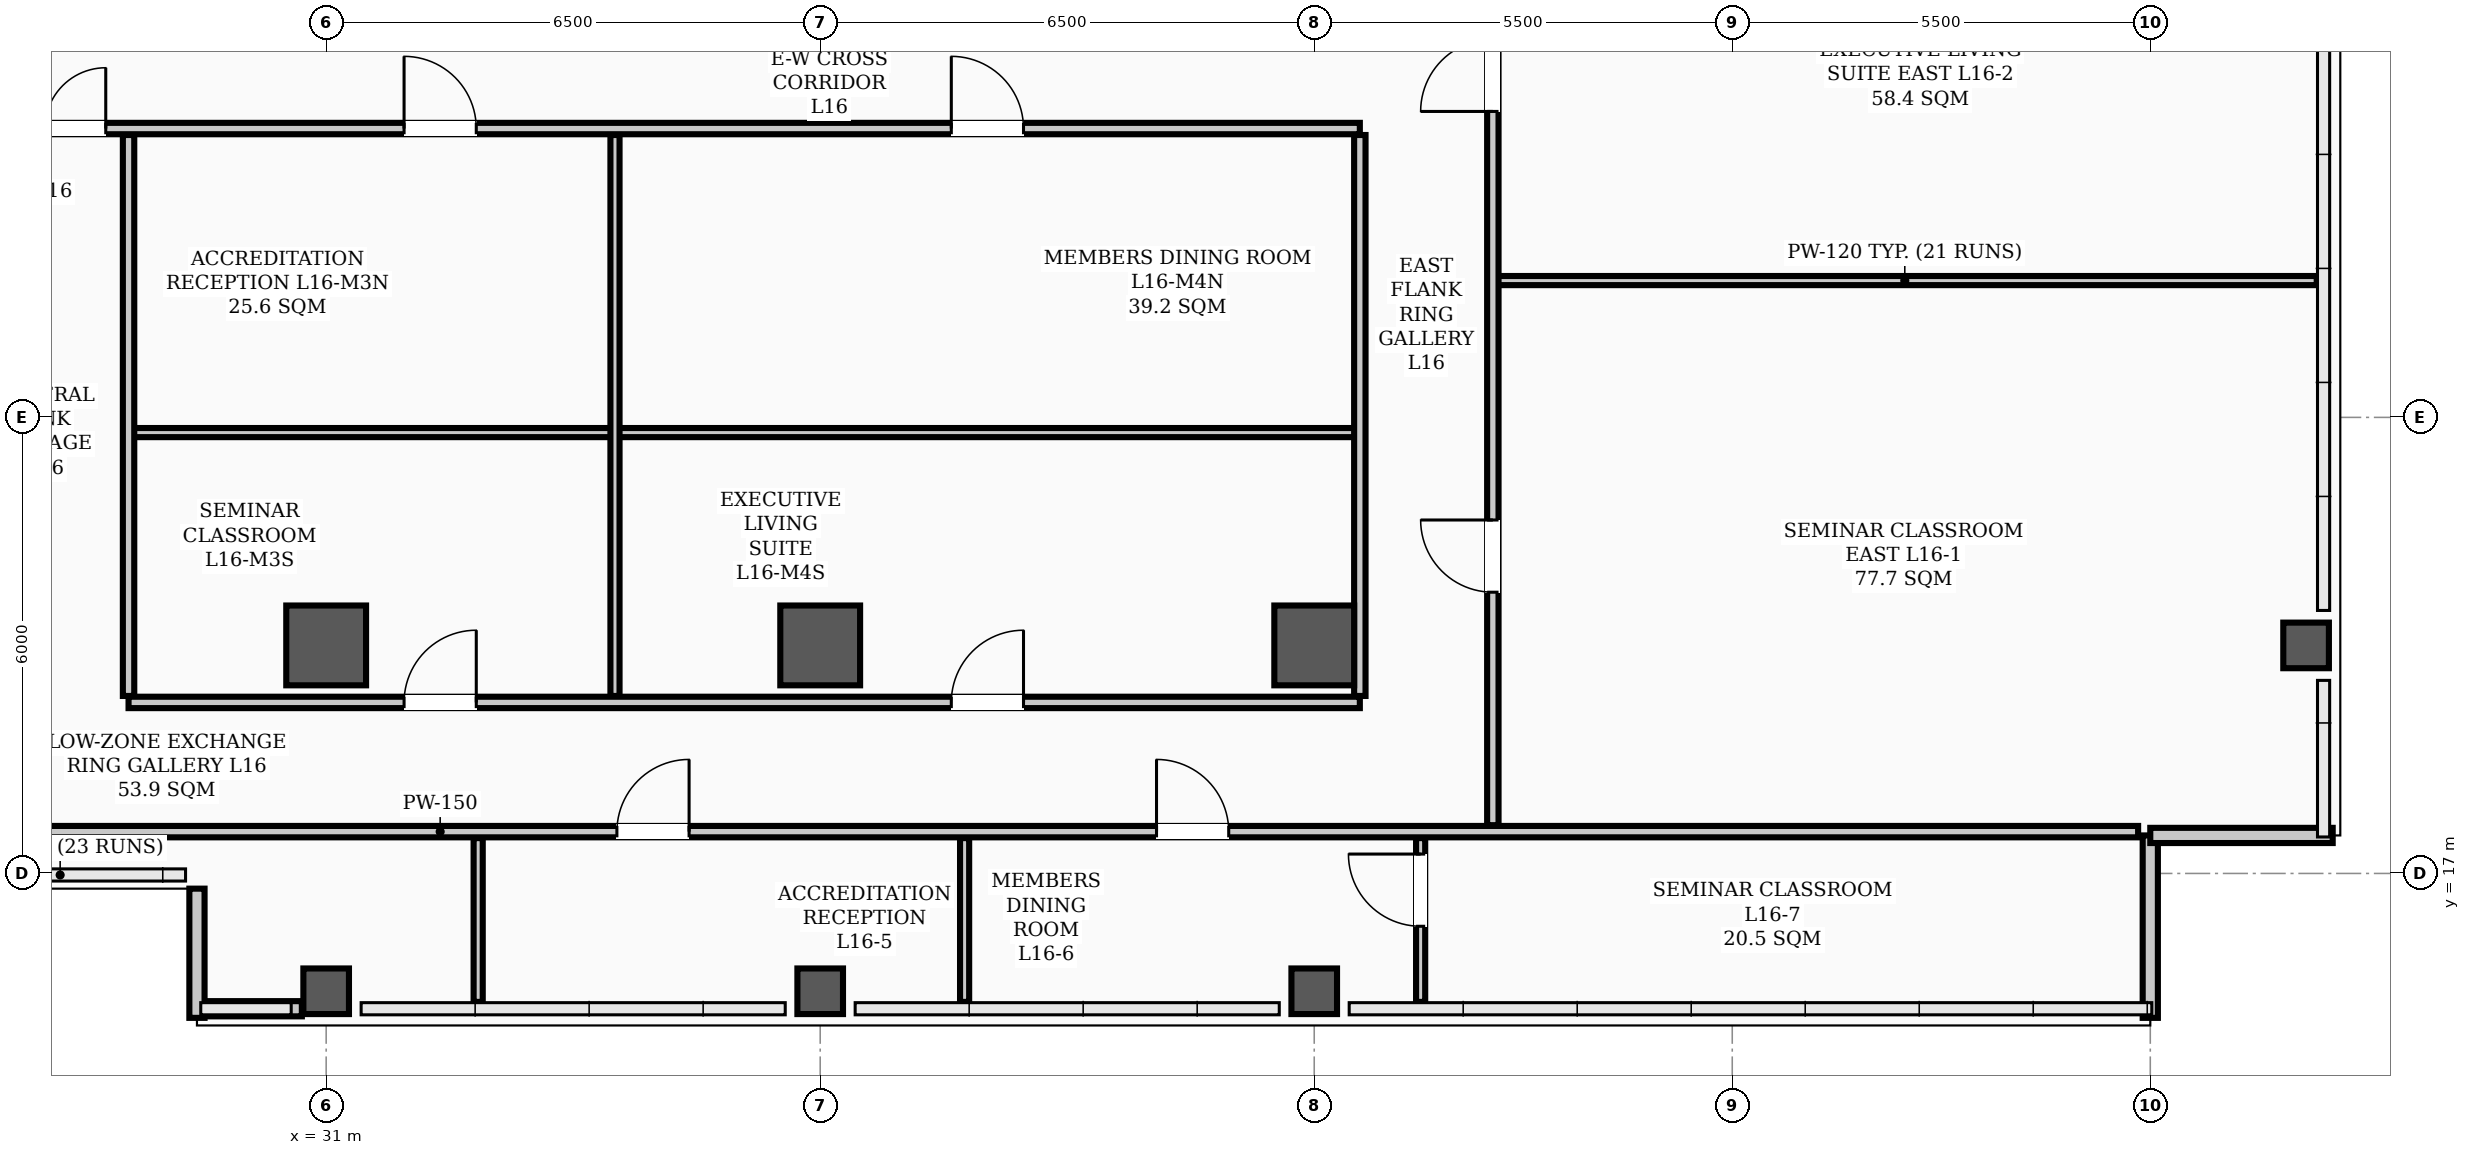
"""IFC4 building model, lengths in metres.
Left out: names, types, materials, properties, quantities, classifications, styles, units other than length and angle.
Written with IfcOpenShell. Run it as: python <this file> out.ifc"""

import sys

from ifc_helpers import new_model, si_unit, direction, frame, frame_2d, origin, origin_2d, place, context, subcontext, project, spatial, rectangle, hollow_rectangle, extrude, element, fill, save


model = new_model("IFC4")
c1 = context("Model", 3, precision=1e-05, world=origin(), true_north=direction((0.0, 1.0)))
c2 = subcontext(c1, "Body", "Model", "MODEL_VIEW")
j1 = project(units=[si_unit("LENGTHUNIT", "METRE"), si_unit("PLANEANGLEUNIT", "RADIAN")], contexts=[c1])
p1 = place(None, origin())
s1 = spatial("IfcSite", under=j1, at=p1, CompositionType="ELEMENT")
p2 = place(p1, origin())
s2 = spatial("IfcBuilding", under=s1, at=p2, CompositionType="ELEMENT")
p3 = place(p2, frame((0.0, 0.0, 65.5)))
s3 = spatial("IfcBuildingStorey", under=s2, at=p3, CompositionType="ELEMENT", Elevation=65.5)
for number, where, z_axis, x_axis in (
    (1, (31.0, 20.0, 0.0), (0.0, 0.0, 1.0), (1.0, 0.0, 0.0)),
    (2, (37.5, 20.0, 0.0), (0.0, 0.0, 1.0), (1.0, 0.0, 0.0)),
    (3, (44.0, 20.0, 0.0), (0.0, 0.0, 1.0), (1.0, 0.0, 0.0)),
):
    element("IfcColumn", number, at=place(p3, frame(where, z_axis=z_axis, x_axis=x_axis)), inside=s3, PredefinedType="COLUMN", context=c2, shape_type="SweptSolid", body=[
        extrude(hollow_rectangle(XDim=1.05, YDim=1.05, WallThickness=0.038, InnerFilletRadius=0.019, OuterFilletRadius=0.057, at=origin_2d()), origin(), (0.0, 0.0, 1.0), 3.9),
    ])
for number, where, z_axis, x_axis in (
    (4, (31.0, 15.45, 0.0), (0.0, 0.0, 1.0), (1.0, 0.0, 0.0)),
    (5, (37.5, 15.45, 0.0), (0.0, 0.0, 1.0), (1.0, 0.0, 0.0)),
    (6, (44.0, 15.45, 0.0), (0.0, 0.0, 1.0), (1.0, 0.0, 0.0)),
    (7, (57.05, 20.0, 0.0), (0.0, 0.0, 1.0), (1.0, 0.0, 0.0)),
):
    element("IfcColumn", number, at=place(p3, frame(where, z_axis=z_axis, x_axis=x_axis)), inside=s3, PredefinedType="COLUMN", context=c2, shape_type="SweptSolid", body=[
        extrude(hollow_rectangle(XDim=0.6, YDim=0.6, WallThickness=0.026, InnerFilletRadius=0.013, OuterFilletRadius=0.039, at=origin_2d()), origin(), (0.0, 0.0, 1.0), 3.9),
    ])
p4 = place(p3, frame((29.35, 15.22, 0.0), z_axis=(0.0, 0.0, 1.0), x_axis=(1.0, 0.0, 0.0)))
e8 = element("IfcWall", 8, at=p4, inside=s3, PredefinedType="PARAPET", context=c2, shape_type="SweptSolid", body=[
    extrude(rectangle(XDim=1.33, YDim=0.2, at=frame_2d((0.665, 0.0))), origin(), (0.0, 0.0, 1.0), 1.2),
])
for number, where, z_axis, x_axis in (
    (9, (55.0, 15.1, 0.0), (0.0, 0.0, 1.0), (0.0, 1.0, 0.0)),
    (10, (55.0, 17.5, 0.0), (0.0, 0.0, 1.0), (1.0, 0.0, 0.0)),
):
    element("IfcWall", number, at=place(p3, frame(where, z_axis=z_axis, x_axis=x_axis)), inside=s3, PredefinedType="PARAPET", context=c2, shape_type="SweptSolid", body=[
        extrude(rectangle(XDim=2.4, YDim=0.2, at=frame_2d((1.2, 0.0))), origin(), (0.0, 0.0, 1.0), 1.2),
    ])
p5 = place(p3, frame((29.3, 16.8, 0.0), z_axis=(0.0, 0.0, 1.0), x_axis=(0.0, -1.0, 0.0)))
e11 = element("IfcWall", 11, at=p5, inside=s3, PredefinedType="PARAPET", context=c2, shape_type="SweptSolid", body=[
    extrude(rectangle(XDim=1.7, YDim=0.2, at=frame_2d((0.85, 0.0))), origin(), (0.0, 0.0, 1.0), 1.2),
])
p6 = place(p3, frame((12.9, 26.8, 0.0), z_axis=(0.0, 0.0, 1.0), x_axis=(1.0, 0.0, 0.0)))
e12 = element("IfcWall", 12, at=p6, inside=s3, PredefinedType="PARTITIONING", context=c2, shape_type="SweptSolid", body=[
    extrude(rectangle(XDim=31.7, YDim=0.15, at=frame_2d((15.85, 0.0))), origin(), (0.0, 0.0, 1.0), 3.1),
])
p7 = place(p6, frame((13.6, 0.0, 0.0)))
e13 = element("IfcOpeningElement", 13, at=p7, cuts=e12, PredefinedType="OPENING", context=c2, shape_type="SweptSolid", body=[
    extrude(rectangle(XDim=1.6, YDim=2.08, at=frame_2d((0.8, 1.04))), frame((0.0, 0.085, 0.0), z_axis=(0.0, -1.0, 0.0), x_axis=(1.0, 0.0, 0.0)), (0.0, 0.0, 1.0), 0.17),
])
p8 = place(p6, frame((2.475, 0.0, 0.0)))
e14 = element("IfcOpeningElement", 14, at=p8, cuts=e12, PredefinedType="OPENING", context=c2, shape_type="SweptSolid", body=[
    extrude(rectangle(XDim=0.95, YDim=2.08, at=frame_2d((0.475, 1.04))), frame((0.0, 0.085, 0.0), z_axis=(0.0, -1.0, 0.0), x_axis=(1.0, 0.0, 0.0)), (0.0, 0.0, 1.0), 0.17),
])
p9 = place(p6, frame((9.125, 0.0, 0.0)))
e15 = element("IfcOpeningElement", 15, at=p9, cuts=e12, PredefinedType="OPENING", context=c2, shape_type="SweptSolid", body=[
    extrude(rectangle(XDim=0.95, YDim=2.08, at=frame_2d((0.475, 1.04))), frame((0.0, 0.085, 0.0), z_axis=(0.0, -1.0, 0.0), x_axis=(1.0, 0.0, 0.0)), (0.0, 0.0, 1.0), 0.17),
])
p10 = place(p6, frame((19.125, 0.0, 0.0)))
e16 = element("IfcOpeningElement", 16, at=p10, cuts=e12, PredefinedType="OPENING", context=c2, shape_type="SweptSolid", body=[
    extrude(rectangle(XDim=0.95, YDim=2.08, at=frame_2d((0.475, 1.04))), frame((0.0, 0.085, 0.0), z_axis=(0.0, -1.0, 0.0), x_axis=(1.0, 0.0, 0.0)), (0.0, 0.0, 1.0), 0.17),
])
p11 = place(p6, frame((26.325, 0.0, 0.0)))
e17 = element("IfcOpeningElement", 17, at=p11, cuts=e12, PredefinedType="OPENING", context=c2, shape_type="SweptSolid", body=[
    extrude(rectangle(XDim=0.95, YDim=2.08, at=frame_2d((0.475, 1.04))), frame((0.0, 0.085, 0.0), z_axis=(0.0, -1.0, 0.0), x_axis=(1.0, 0.0, 0.0)), (0.0, 0.0, 1.0), 0.17),
])
p12 = place(p3, frame((10.16, 17.55, 0.0), z_axis=(0.0, 0.0, 1.0), x_axis=(1.0, 0.0, 0.0)))
e18 = element("IfcWall", 18, at=p12, inside=s3, PredefinedType="PARTITIONING", context=c2, shape_type="SweptSolid", body=[
    extrude(rectangle(XDim=44.68, YDim=0.15, at=frame_2d((22.34, 0.0))), origin(), (0.0, 0.0, 1.0), 3.1),
])
p13 = place(p12, frame((2.04, 0.0, 0.0)))
e19 = element("IfcOpeningElement", 19, at=p13, cuts=e18, PredefinedType="OPENING", context=c2, shape_type="SweptSolid", body=[
    extrude(rectangle(XDim=0.95, YDim=2.08, at=frame_2d((0.475, 1.04))), frame((0.0, 0.085, 0.0), z_axis=(0.0, -1.0, 0.0), x_axis=(1.0, 0.0, 0.0)), (0.0, 0.0, 1.0), 0.17),
])
p14 = place(p12, frame((6.565, 0.0, 0.0)))
e20 = element("IfcOpeningElement", 20, at=p14, cuts=e18, PredefinedType="OPENING", context=c2, shape_type="SweptSolid", body=[
    extrude(rectangle(XDim=0.95, YDim=2.08, at=frame_2d((0.475, 1.04))), frame((0.0, 0.085, 0.0), z_axis=(0.0, -1.0, 0.0), x_axis=(1.0, 0.0, 0.0)), (0.0, 0.0, 1.0), 0.17),
])
p15 = place(p12, frame((11.865, 0.0, 0.0)))
e21 = element("IfcOpeningElement", 21, at=p15, cuts=e18, PredefinedType="OPENING", context=c2, shape_type="SweptSolid", body=[
    extrude(rectangle(XDim=0.95, YDim=2.08, at=frame_2d((0.475, 1.04))), frame((0.0, 0.085, 0.0), z_axis=(0.0, -1.0, 0.0), x_axis=(1.0, 0.0, 0.0)), (0.0, 0.0, 1.0), 0.17),
])
p16 = place(p12, frame((24.665, 0.0, 0.0)))
e22 = element("IfcOpeningElement", 22, at=p16, cuts=e18, PredefinedType="OPENING", context=c2, shape_type="SweptSolid", body=[
    extrude(rectangle(XDim=0.95, YDim=2.08, at=frame_2d((0.475, 1.04))), frame((0.0, 0.085, 0.0), z_axis=(0.0, -1.0, 0.0), x_axis=(1.0, 0.0, 0.0)), (0.0, 0.0, 1.0), 0.17),
])
p17 = place(p12, frame((31.765, 0.0, 0.0)))
e23 = element("IfcOpeningElement", 23, at=p17, cuts=e18, PredefinedType="OPENING", context=c2, shape_type="SweptSolid", body=[
    extrude(rectangle(XDim=0.95, YDim=2.08, at=frame_2d((0.475, 1.04))), frame((0.0, 0.085, 0.0), z_axis=(0.0, -1.0, 0.0), x_axis=(1.0, 0.0, 0.0)), (0.0, 0.0, 1.0), 0.17),
])
p18 = place(p3, frame((28.4, 19.25, 0.0), z_axis=(0.0, 0.0, 1.0), x_axis=(1.0, 0.0, 0.0)))
e24 = element("IfcWall", 24, at=p18, inside=s3, PredefinedType="PARTITIONING", context=c2, shape_type="SweptSolid", body=[
    extrude(rectangle(XDim=16.2, YDim=0.15, at=frame_2d((8.1, 0.0))), origin(), (0.0, 0.0, 1.0), 3.1),
])
p19 = place(p18, frame((3.625, 0.0, 0.0)))
e25 = element("IfcOpeningElement", 25, at=p19, cuts=e24, PredefinedType="OPENING", context=c2, shape_type="SweptSolid", body=[
    extrude(rectangle(XDim=0.95, YDim=2.08, at=frame_2d((0.475, 1.04))), frame((0.0, 0.085, 0.0), z_axis=(0.0, -1.0, 0.0), x_axis=(1.0, 0.0, 0.0)), (0.0, 0.0, 1.0), 0.17),
])
p20 = place(p18, frame((10.825, 0.0, 0.0)))
e26 = element("IfcOpeningElement", 26, at=p20, cuts=e24, PredefinedType="OPENING", context=c2, shape_type="SweptSolid", body=[
    extrude(rectangle(XDim=0.95, YDim=2.08, at=frame_2d((0.475, 1.04))), frame((0.0, 0.085, 0.0), z_axis=(0.0, -1.0, 0.0), x_axis=(1.0, 0.0, 0.0)), (0.0, 0.0, 1.0), 0.17),
])
p21 = place(p3, frame((28.4, 22.8, 0.0), z_axis=(0.0, 0.0, 1.0), x_axis=(1.0, 0.0, 0.0)))
e27 = element("IfcWall", 27, at=p21, inside=s3, PredefinedType="PARTITIONING", context=c2, shape_type="SweptSolid", body=[
    extrude(rectangle(XDim=6.4, YDim=0.12, at=frame_2d((3.2, 0.0))), origin(), (0.0, 0.0, 1.0), 3.1),
])
p22 = place(p3, frame((34.8, 22.8, 0.0), z_axis=(0.0, 0.0, 1.0), x_axis=(1.0, 0.0, 0.0)))
e28 = element("IfcWall", 28, at=p22, inside=s3, PredefinedType="PARTITIONING", context=c2, shape_type="SweptSolid", body=[
    extrude(rectangle(XDim=9.8, YDim=0.12, at=frame_2d((4.9, 0.0))), origin(), (0.0, 0.0, 1.0), 3.1),
])
p23 = place(p3, frame((46.35, 24.8, 0.0), z_axis=(0.0, 0.0, 1.0), x_axis=(1.0, 0.0, 0.0)))
e29 = element("IfcWall", 29, at=p23, inside=s3, PredefinedType="PARTITIONING", context=c2, shape_type="SweptSolid", body=[
    extrude(rectangle(XDim=10.84, YDim=0.12, at=frame_2d((5.42, 0.0))), origin(), (0.0, 0.0, 1.0), 3.212),
])
p24 = place(p3, frame((28.4, 19.335, 0.0), z_axis=(0.0, 0.0, 1.0), x_axis=(0.0, 1.0, 0.0)))
e30 = element("IfcWall", 30, at=p24, inside=s3, PredefinedType="PARTITIONING", context=c2, shape_type="SweptSolid", body=[
    extrude(rectangle(XDim=7.38, YDim=0.15, at=frame_2d((3.69, 0.0))), origin(), (0.0, 0.0, 1.0), 3.0),
])
p25 = place(p3, frame((46.35, 17.635, 0.0), z_axis=(0.0, 0.0, 1.0), x_axis=(0.0, 1.0, 0.0)))
e31 = element("IfcWall", 31, at=p25, inside=s3, PredefinedType="PARTITIONING", context=c2, shape_type="SweptSolid", body=[
    extrude(rectangle(XDim=22.53, YDim=0.15, at=frame_2d((11.265, 0.0))), origin(), (0.0, 0.0, 1.0), 3.0),
])
p26 = place(p25, frame((3.065, 0.0, 0.0)))
e32 = element("IfcOpeningElement", 32, at=p26, cuts=e31, PredefinedType="OPENING", context=c2, shape_type="SweptSolid", body=[
    extrude(rectangle(XDim=0.95, YDim=2.08, at=frame_2d((0.475, 1.04))), frame((0.0, 0.085, 0.0), z_axis=(0.0, -1.0, 0.0), x_axis=(1.0, 0.0, 0.0)), (0.0, 0.0, 1.0), 0.17),
])
p27 = place(p25, frame((9.39, 0.0, 0.0)))
e33 = element("IfcOpeningElement", 33, at=p27, cuts=e31, PredefinedType="OPENING", context=c2, shape_type="SweptSolid", body=[
    extrude(rectangle(XDim=0.95, YDim=2.08, at=frame_2d((0.475, 1.04))), frame((0.0, 0.085, 0.0), z_axis=(0.0, -1.0, 0.0), x_axis=(1.0, 0.0, 0.0)), (0.0, 0.0, 1.0), 0.17),
])
p28 = place(p25, frame((14.69, 0.0, 0.0)))
e34 = element("IfcOpeningElement", 34, at=p28, cuts=e31, PredefinedType="OPENING", context=c2, shape_type="SweptSolid", body=[
    extrude(rectangle(XDim=0.95, YDim=2.08, at=frame_2d((0.475, 1.04))), frame((0.0, 0.085, 0.0), z_axis=(0.0, -1.0, 0.0), x_axis=(1.0, 0.0, 0.0)), (0.0, 0.0, 1.0), 0.17),
])
p29 = place(p25, frame((19.715, 0.0, 0.0)))
e35 = element("IfcOpeningElement", 35, at=p29, cuts=e31, PredefinedType="OPENING", context=c2, shape_type="SweptSolid", body=[
    extrude(rectangle(XDim=0.95, YDim=2.08, at=frame_2d((0.475, 1.04))), frame((0.0, 0.085, 0.0), z_axis=(0.0, -1.0, 0.0), x_axis=(1.0, 0.0, 0.0)), (0.0, 0.0, 1.0), 0.17),
])
p30 = place(p3, frame((44.6, 19.335, 0.0), z_axis=(0.0, 0.0, 1.0), x_axis=(0.0, 1.0, 0.0)))
e36 = element("IfcWall", 36, at=p30, inside=s3, PredefinedType="PARTITIONING", context=c2, shape_type="SweptSolid", body=[
    extrude(rectangle(XDim=7.38, YDim=0.15, at=frame_2d((3.69, 0.0))), origin(), (0.0, 0.0, 1.0), 3.0),
])
for number, where, z_axis, x_axis in (
    (37, (33.0, 15.31, 0.0), (0.0, 0.0, 1.0), (0.0, 1.0, 0.0)),
    (38, (39.4, 15.31, 0.0), (0.0, 0.0, 1.0), (0.0, 1.0, 0.0)),
):
    element("IfcWall", number, at=place(p3, frame(where, z_axis=z_axis, x_axis=x_axis)), inside=s3, PredefinedType="PARTITIONING", context=c2, shape_type="SweptSolid", body=[
        extrude(rectangle(XDim=2.155, YDim=0.12, at=frame_2d((1.078, 0.0))), origin(), (0.0, 0.0, 1.0), 3.212),
    ])
p31 = place(p3, frame((45.4, 15.31, 0.0), z_axis=(0.0, 0.0, 1.0), x_axis=(0.0, 1.0, 0.0)))
e39 = element("IfcWall", 39, at=p31, inside=s3, PredefinedType="PARTITIONING", context=c2, shape_type="SweptSolid", body=[
    extrude(rectangle(XDim=2.155, YDim=0.12, at=frame_2d((1.078, 0.0))), origin(), (0.0, 0.0, 1.0), 3.72),
])
p32 = place(p31, frame((0.995, 0.0, 0.0)))
e40 = element("IfcOpeningElement", 40, at=p32, cuts=e39, PredefinedType="OPENING", context=c2, shape_type="SweptSolid", body=[
    extrude(rectangle(XDim=0.95, YDim=2.08, at=frame_2d((0.475, 1.04))), frame((0.0, 0.07, 0.0), z_axis=(0.0, -1.0, 0.0), x_axis=(1.0, 0.0, 0.0)), (0.0, 0.0, 1.0), 0.14),
])
p33 = place(p3, frame((34.8, 19.335, 0.0), z_axis=(0.0, 0.0, 1.0), x_axis=(0.0, 1.0, 0.0)))
e41 = element("IfcWall", 41, at=p33, inside=s3, PredefinedType="PARTITIONING", context=c2, shape_type="SweptSolid", body=[
    extrude(rectangle(XDim=7.38, YDim=0.12, at=frame_2d((3.69, 0.0))), origin(), (0.0, 0.0, 1.0), 3.0),
])
p34 = place(p7, origin())
e42 = element("IfcDoor", 42, at=p34, inside=s3, OperationType="DOUBLE_DOOR_SINGLE_SWING", PredefinedType="DOOR", context=c2, shape_type="SweptSolid", body=[
    extrude(rectangle(XDim=1.6, YDim=2.08, at=frame_2d((0.8, 1.04))), frame((0.0, 0.025, 0.0), z_axis=(0.0, -1.0, 0.0), x_axis=(1.0, 0.0, 0.0)), (0.0, 0.0, 1.0), 0.05),
])
fill(e13, e42)
p35 = place(p16, origin())
e43 = element("IfcDoor", 43, at=p35, inside=s3, OperationType="SINGLE_SWING_RIGHT", PredefinedType="DOOR", context=c2, shape_type="SweptSolid", body=[
    extrude(rectangle(XDim=0.95, YDim=2.08, at=frame_2d((0.475, 1.04))), frame((0.0, 0.025, 0.0), z_axis=(0.0, -1.0, 0.0), x_axis=(1.0, 0.0, 0.0)), (0.0, 0.0, 1.0), 0.05),
])
fill(e22, e43)
p36 = place(p17, origin())
e44 = element("IfcDoor", 44, at=p36, inside=s3, OperationType="SINGLE_SWING_LEFT", PredefinedType="DOOR", context=c2, shape_type="SweptSolid", body=[
    extrude(rectangle(XDim=0.95, YDim=2.08, at=frame_2d((0.475, 1.04))), frame((0.0, 0.025, 0.0), z_axis=(0.0, -1.0, 0.0), x_axis=(1.0, 0.0, 0.0)), (0.0, 0.0, 1.0), 0.05),
])
fill(e23, e44)
p37 = place(p32, origin())
e45 = element("IfcDoor", 45, at=p37, inside=s3, OperationType="SINGLE_SWING_RIGHT", PredefinedType="DOOR", context=c2, shape_type="SweptSolid", body=[
    extrude(rectangle(XDim=0.95, YDim=2.08, at=frame_2d((0.475, 1.04))), frame((0.0, 0.025, 0.0), z_axis=(0.0, -1.0, 0.0), x_axis=(1.0, 0.0, 0.0)), (0.0, 0.0, 1.0), 0.05),
])
fill(e40, e45)
p38 = place(p10, origin())
e46 = element("IfcDoor", 46, at=p38, inside=s3, OperationType="SINGLE_SWING_LEFT", PredefinedType="DOOR", context=c2, shape_type="SweptSolid", body=[
    extrude(rectangle(XDim=0.95, YDim=2.08, at=frame_2d((0.475, 1.04))), frame((0.0, 0.025, 0.0), z_axis=(0.0, -1.0, 0.0), x_axis=(1.0, 0.0, 0.0)), (0.0, 0.0, 1.0), 0.05),
])
fill(e16, e46)
p39 = place(p19, origin())
e47 = element("IfcDoor", 47, at=p39, inside=s3, OperationType="SINGLE_SWING_RIGHT", PredefinedType="DOOR", context=c2, shape_type="SweptSolid", body=[
    extrude(rectangle(XDim=0.95, YDim=2.08, at=frame_2d((0.475, 1.04))), frame((0.0, 0.025, 0.0), z_axis=(0.0, -1.0, 0.0), x_axis=(1.0, 0.0, 0.0)), (0.0, 0.0, 1.0), 0.05),
])
fill(e25, e47)
p40 = place(p11, origin())
e48 = element("IfcDoor", 48, at=p40, inside=s3, OperationType="SINGLE_SWING_LEFT", PredefinedType="DOOR", context=c2, shape_type="SweptSolid", body=[
    extrude(rectangle(XDim=0.95, YDim=2.08, at=frame_2d((0.475, 1.04))), frame((0.0, 0.025, 0.0), z_axis=(0.0, -1.0, 0.0), x_axis=(1.0, 0.0, 0.0)), (0.0, 0.0, 1.0), 0.05),
])
fill(e17, e48)
p41 = place(p20, origin())
e49 = element("IfcDoor", 49, at=p41, inside=s3, OperationType="SINGLE_SWING_RIGHT", PredefinedType="DOOR", context=c2, shape_type="SweptSolid", body=[
    extrude(rectangle(XDim=0.95, YDim=2.08, at=frame_2d((0.475, 1.04))), frame((0.0, 0.025, 0.0), z_axis=(0.0, -1.0, 0.0), x_axis=(1.0, 0.0, 0.0)), (0.0, 0.0, 1.0), 0.05),
])
fill(e26, e49)
p42 = place(p26, origin())
e50 = element("IfcDoor", 50, at=p42, inside=s3, OperationType="SINGLE_SWING_RIGHT", PredefinedType="DOOR", context=c2, shape_type="SweptSolid", body=[
    extrude(rectangle(XDim=0.95, YDim=2.08, at=frame_2d((0.475, 1.04))), frame((0.0, 0.025, 0.0), z_axis=(0.0, -1.0, 0.0), x_axis=(1.0, 0.0, 0.0)), (0.0, 0.0, 1.0), 0.05),
])
fill(e32, e50)
p43 = place(p27, origin())
e51 = element("IfcDoor", 51, at=p43, inside=s3, OperationType="SINGLE_SWING_LEFT", PredefinedType="DOOR", context=c2, shape_type="SweptSolid", body=[
    extrude(rectangle(XDim=0.95, YDim=2.08, at=frame_2d((0.475, 1.04))), frame((0.0, 0.025, 0.0), z_axis=(0.0, -1.0, 0.0), x_axis=(1.0, 0.0, 0.0)), (0.0, 0.0, 1.0), 0.05),
])
fill(e33, e51)
save(model, sys.argv[1])
